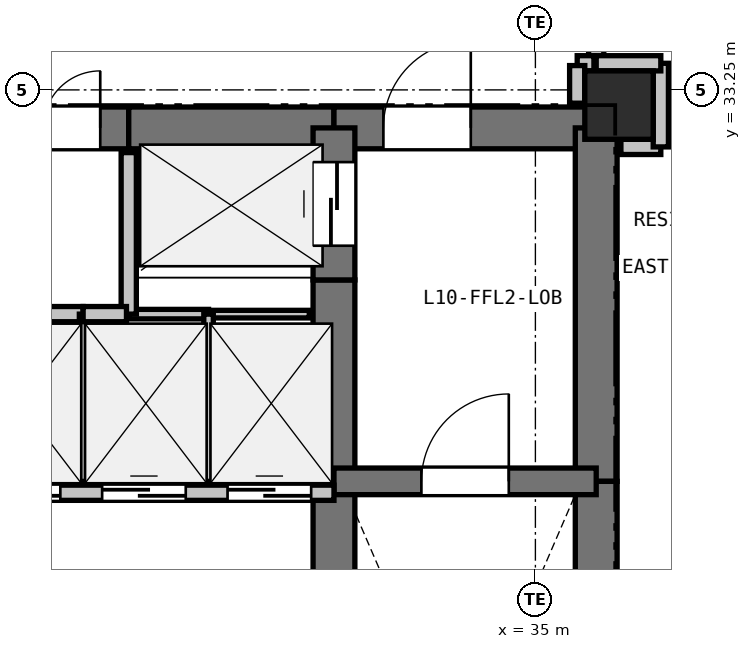
"""IFC4 building model, lengths in metres.
Left out: names, types, materials, properties, quantities, classifications, styles, units other than length and angle.
Written with IfcOpenShell. Run it as: python <this file> out.ifc"""

import sys

from ifc_helpers import new_model, si_unit, direction, frame, frame_2d, origin, origin_2d, place, context, subcontext, project, spatial, rectangle, extrude, element, fill, save


model = new_model("IFC4")
c1 = context("Model", 3, precision=1e-05, world=origin(), true_north=direction((0.0, 1.0)))
c2 = subcontext(c1, "Body", "Model", "MODEL_VIEW")
j1 = project(units=[si_unit("LENGTHUNIT", "METRE"), si_unit("PLANEANGLEUNIT", "RADIAN")], contexts=[c1])
p1 = place(None, origin())
s1 = spatial("IfcSite", under=j1, at=p1, CompositionType="ELEMENT")
p2 = place(p1, origin())
s2 = spatial("IfcBuilding", under=s1, at=p2, CompositionType="ELEMENT")
p3 = place(p2, frame((0.0, 0.0, 39.0)))
s3 = spatial("IfcBuildingStorey", under=s2, at=p3, CompositionType="ELEMENT", Elevation=39.0)
p4 = place(p3, frame((36.1, 33.05, 0.0), z_axis=(0.0, 0.0, 1.0), x_axis=(1.0, 0.0, 0.0)))
e1 = element("IfcColumn", 1, at=p4, inside=s3, PredefinedType="COLUMN", context=c2, shape_type="SweptSolid", body=[
    extrude(rectangle(XDim=0.9, YDim=0.9, at=origin_2d()), origin(), (0.0, 0.0, 1.0), 3.3),
])
p5 = place(p3, frame((27.4, 32.75, 0.0), z_axis=(0.0, 0.0, 1.0), x_axis=(1.0, 0.0, 0.0)))
e2 = element("IfcWall", 2, at=p5, inside=s3, PredefinedType="SHEAR", context=c2, shape_type="SweptSolid", body=[
    extrude(rectangle(XDim=2.25, YDim=0.55, at=frame_2d((1.125, 0.0))), origin(), (0.0, 0.0, 1.0), 3.04),
])
p6 = place(p5, frame((0.375, 0.0, 0.0)))
e3 = element("IfcOpeningElement", 3, at=p6, cuts=e2, PredefinedType="OPENING", context=c2, shape_type="SweptSolid", body=[
    extrude(rectangle(XDim=1.5, YDim=2.2, at=frame_2d((0.75, 1.1))), frame((0.0, 0.285, 0.0), z_axis=(0.0, -1.0, 0.0), x_axis=(1.0, 0.0, 0.0)), (0.0, 0.0, 1.0), 0.57),
])
p7 = place(p3, frame((29.65, 32.75, 0.0), z_axis=(0.0, 0.0, 1.0), x_axis=(1.0, 0.0, 0.0)))
e4 = element("IfcWall", 4, at=p7, inside=s3, PredefinedType="SHEAR", context=c2, shape_type="SweptSolid", body=[
    extrude(rectangle(XDim=2.7, YDim=0.55, at=frame_2d((1.35, 0.0))), origin(), (0.0, 0.0, 1.0), 3.04),
])
p8 = place(p3, frame((32.35, 32.75, 0.0), z_axis=(0.0, 0.0, 1.0), x_axis=(1.0, 0.0, 0.0)))
e5 = element("IfcWall", 5, at=p8, inside=s3, PredefinedType="SHEAR", context=c2, shape_type="SweptSolid", body=[
    extrude(rectangle(XDim=3.45, YDim=0.55, at=frame_2d((1.725, 0.0))), origin(), (0.0, 0.0, 1.0), 3.04),
])
p9 = place(p8, frame((0.65, 0.0, 0.0)))
e6 = element("IfcOpeningElement", 6, at=p9, cuts=e5, PredefinedType="OPENING", context=c2, shape_type="SweptSolid", body=[
    extrude(rectangle(XDim=1.15, YDim=2.15, at=frame_2d((0.575, 1.075))), frame((0.0, 0.285, 0.0), z_axis=(0.0, -1.0, 0.0), x_axis=(1.0, 0.0, 0.0)), (0.0, 0.0, 1.0), 0.57),
])
p10 = place(p3, frame((35.8, 32.75, 0.0), z_axis=(0.0, 0.0, 1.0), x_axis=(0.0, -1.0, 0.0)))
e7 = element("IfcWall", 7, at=p10, inside=s3, PredefinedType="SHEAR", context=c2, shape_type="SweptSolid", body=[
    extrude(rectangle(XDim=4.65, YDim=0.55, at=frame_2d((2.325, 0.0))), origin(), (0.0, 0.0, 1.0), 3.04),
])
p11 = place(p3, frame((35.8, 28.1, 0.0), z_axis=(0.0, 0.0, 1.0), x_axis=(0.0, -1.0, 0.0)))
e8 = element("IfcWall", 8, at=p11, inside=s3, PredefinedType="SHEAR", context=c2, shape_type="SweptSolid", body=[
    extrude(rectangle(XDim=7.35, YDim=0.55, at=frame_2d((3.675, 0.0))), origin(), (0.0, 0.0, 1.0), 3.04),
])
p12 = place(p3, frame((32.35, 25.55, 0.0), z_axis=(0.0, 0.0, 1.0), x_axis=(0.0, 1.0, 0.0)))
e9 = element("IfcWall", 9, at=p12, inside=s3, PredefinedType="SHEAR", context=c2, shape_type="SweptSolid", body=[
    extrude(rectangle(XDim=2.4, YDim=0.55, at=frame_2d((1.2, 0.0))), origin(), (0.0, 0.0, 1.0), 3.04),
])
p13 = place(p3, frame((32.35, 27.95, 0.0), z_axis=(0.0, 0.0, 1.0), x_axis=(0.0, 1.0, 0.0)))
e10 = element("IfcWall", 10, at=p13, inside=s3, PredefinedType="SHEAR", context=c2, shape_type="SweptSolid", body=[
    extrude(rectangle(XDim=2.8, YDim=0.55, at=frame_2d((1.4, 0.0))), origin(), (0.0, 0.0, 1.0), 3.04),
])
p14 = place(p3, frame((32.35, 30.75, 0.0), z_axis=(0.0, 0.0, 1.0), x_axis=(0.0, 1.0, 0.0)))
e11 = element("IfcWall", 11, at=p14, inside=s3, PredefinedType="SHEAR", context=c2, shape_type="SweptSolid", body=[
    extrude(rectangle(XDim=2.0, YDim=0.55, at=frame_2d((1.0, 0.0))), origin(), (0.0, 0.0, 1.0), 3.04),
])
p15 = place(p14, frame((0.45, 0.0, 0.0)))
e12 = element("IfcOpeningElement", 12, at=p15, cuts=e11, PredefinedType="OPENING", context=c2, shape_type="SweptSolid", body=[
    extrude(rectangle(XDim=1.1, YDim=2.15, at=frame_2d((0.55, 1.075))), frame((0.0, 0.285, 0.0), z_axis=(0.0, -1.0, 0.0), x_axis=(1.0, 0.0, 0.0)), (0.0, 0.0, 1.0), 0.57),
])
p16 = place(p3, frame((32.35, 28.1, 0.0), z_axis=(0.0, 0.0, 1.0), x_axis=(1.0, 0.0, 0.0)))
e13 = element("IfcWall", 13, at=p16, inside=s3, PredefinedType="SHEAR", context=c2, shape_type="SweptSolid", body=[
    extrude(rectangle(XDim=3.45, YDim=0.35, at=frame_2d((1.725, 0.0))), origin(), (0.0, 0.0, 1.0), 3.04),
])
p17 = place(p16, frame((1.15, 0.0, 0.0)))
e14 = element("IfcOpeningElement", 14, at=p17, cuts=e13, PredefinedType="OPENING", context=c2, shape_type="SweptSolid", body=[
    extrude(rectangle(XDim=1.15, YDim=2.15, at=frame_2d((0.575, 1.075))), frame((0.0, 0.185, 0.0), z_axis=(0.0, -1.0, 0.0), x_axis=(1.0, 0.0, 0.0)), (0.0, 0.0, 1.0), 0.37),
])
p18 = place(p3, frame((27.4, 27.95, 0.0), z_axis=(0.0, 0.0, 1.0), x_axis=(1.0, 0.0, 0.0)))
e15 = element("IfcWall", 15, at=p18, inside=s3, PredefinedType="PARTITIONING", context=c2, shape_type="SweptSolid", body=[
    extrude(rectangle(XDim=4.95, YDim=0.2, at=frame_2d((2.475, 0.0))), origin(), (0.0, 0.0, 1.0), 3.04),
])
p19 = place(p18, frame((0.25, 0.0, 0.0)))
e16 = element("IfcOpeningElement", 16, at=p19, cuts=e15, PredefinedType="OPENING", context=c2, shape_type="SweptSolid", body=[
    extrude(rectangle(XDim=1.1, YDim=2.15, at=frame_2d((0.55, 1.075))), frame((0.0, 0.11, 0.0), z_axis=(0.0, -1.0, 0.0), x_axis=(1.0, 0.0, 0.0)), (0.0, 0.0, 1.0), 0.22),
])
p20 = place(p18, frame((1.9, 0.0, 0.0)))
e17 = element("IfcOpeningElement", 17, at=p20, cuts=e15, PredefinedType="OPENING", context=c2, shape_type="SweptSolid", body=[
    extrude(rectangle(XDim=1.1, YDim=2.15, at=frame_2d((0.55, 1.075))), frame((0.0, 0.11, 0.0), z_axis=(0.0, -1.0, 0.0), x_axis=(1.0, 0.0, 0.0)), (0.0, 0.0, 1.0), 0.22),
])
p21 = place(p18, frame((3.55, 0.0, 0.0)))
e18 = element("IfcOpeningElement", 18, at=p21, cuts=e15, PredefinedType="OPENING", context=c2, shape_type="SweptSolid", body=[
    extrude(rectangle(XDim=1.1, YDim=2.15, at=frame_2d((0.55, 1.075))), frame((0.0, 0.11, 0.0), z_axis=(0.0, -1.0, 0.0), x_axis=(1.0, 0.0, 0.0)), (0.0, 0.0, 1.0), 0.22),
])
p22 = place(p3, frame((32.025, 30.3, 0.0), z_axis=(0.0, 0.0, 1.0), x_axis=(-1.0, 0.0, 0.0)))
e19 = element("IfcWall", 19, at=p22, inside=s3, PredefinedType="PARTITIONING", context=c2, shape_type="SweptSolid", body=[
    extrude(rectangle(XDim=1.325, YDim=0.1, at=frame_2d((0.663, 0.0))), origin(), (0.0, 0.0, 1.0), 3.04),
])
p23 = place(p3, frame((30.7, 30.3, 0.0), z_axis=(0.0, 0.0, 1.0), x_axis=(-1.0, 0.0, 0.0)))
e20 = element("IfcWall", 20, at=p23, inside=s3, PredefinedType="PARTITIONING", context=c2, shape_type="SweptSolid", body=[
    extrude(rectangle(XDim=1.05, YDim=0.125, at=frame_2d((0.525, 0.0))), origin(), (0.0, 0.0, 1.0), 3.04),
])
p24 = place(p3, frame((29.65, 30.3, 0.0), z_axis=(0.0, 0.0, 1.0), x_axis=(0.0, 1.0, 0.0)))
e21 = element("IfcWall", 21, at=p24, inside=s3, PredefinedType="PARTITIONING", context=c2, shape_type="SweptSolid", body=[
    extrude(rectangle(XDim=2.125, YDim=0.2, at=frame_2d((1.062, 0.0))), origin(), (0.0, 0.0, 1.0), 3.04),
])
p25 = place(p3, frame((27.4, 30.3, 0.0), z_axis=(0.0, 0.0, 1.0), x_axis=(1.0, 0.0, 0.0)))
e22 = element("IfcWall", 22, at=p25, inside=s3, PredefinedType="PARTITIONING", context=c2, shape_type="SweptSolid", body=[
    extrude(rectangle(XDim=1.65, YDim=0.2, at=frame_2d((0.825, 0.0))), origin(), (0.0, 0.0, 1.0), 3.04),
])
p26 = place(p3, frame((29.05, 30.3, 0.0), z_axis=(0.0, 0.0, 1.0), x_axis=(0.0, -1.0, 0.0)))
e23 = element("IfcWall", 23, at=p26, inside=s3, PredefinedType="PARTITIONING", context=c2, shape_type="SweptSolid", body=[
    extrude(rectangle(XDim=2.2, YDim=0.1, at=frame_2d((1.1, 0.0))), origin(), (0.0, 0.0, 1.0), 3.04),
])
p27 = place(p3, frame((29.05, 30.3, 0.0), z_axis=(0.0, 0.0, 1.0), x_axis=(1.0, 0.0, 0.0)))
e24 = element("IfcWall", 24, at=p27, inside=s3, PredefinedType="PARTITIONING", context=c2, shape_type="SweptSolid", body=[
    extrude(rectangle(XDim=0.57, YDim=0.2, at=frame_2d((0.285, 0.0))), origin(), (0.0, 0.0, 1.0), 3.04),
])
p28 = place(p3, frame((30.7, 30.3, 0.0), z_axis=(0.0, 0.0, 1.0), x_axis=(0.0, -1.0, 0.0)))
e25 = element("IfcWall", 25, at=p28, inside=s3, PredefinedType="PARTITIONING", context=c2, shape_type="SweptSolid", body=[
    extrude(rectangle(XDim=2.2, YDim=0.125, at=frame_2d((1.1, 0.0))), origin(), (0.0, 0.0, 1.0), 3.04),
])
p29 = place(p3, frame((35.8, 35.35, 0.0), z_axis=(0.0, 0.0, 1.0), x_axis=(0.0, -1.0, 0.0)))
e26 = element("IfcWall", 26, at=p29, inside=s3, PredefinedType="PARTITIONING", context=c2, shape_type="SweptSolid", body=[
    extrude(rectangle(XDim=1.75, YDim=0.2, at=frame_2d((0.875, 0.0))), origin(), (0.0, 0.0, 1.0), 3.04),
])
p30 = place(p29, frame((0.375, 0.0, 0.0)))
e27 = element("IfcOpeningElement", 27, at=p30, cuts=e26, PredefinedType="OPENING", context=c2, shape_type="SweptSolid", body=[
    extrude(rectangle(XDim=1.0, YDim=2.15, at=frame_2d((0.5, 1.075))), frame((0.0, 0.11, 0.0), z_axis=(0.0, -1.0, 0.0), x_axis=(1.0, 0.0, 0.0)), (0.0, 0.0, 1.0), 0.22),
])
p31 = place(p3, frame((35.77, 33.6, 0.0), z_axis=(0.0, 0.0, 1.0), x_axis=(-1.0, 0.0, 0.0)))
e28 = element("IfcWall", 28, at=p31, inside=s3, PredefinedType="PARTITIONING", context=c2, shape_type="SweptSolid", body=[
    extrude(rectangle(XDim=0.22, YDim=0.2, at=frame_2d((0.11, 0.0))), origin(), (0.0, 0.0, 1.0), 3.04),
])
p32 = place(p3, frame((35.55, 33.57, 0.0), z_axis=(0.0, 0.0, 1.0), x_axis=(0.0, -1.0, 0.0)))
e29 = element("IfcWall", 29, at=p32, inside=s3, PredefinedType="PARTITIONING", context=c2, shape_type="SweptSolid", body=[
    extrude(rectangle(XDim=0.495, YDim=0.2, at=frame_2d((0.248, 0.0))), origin(), (0.0, 0.0, 1.0), 2.488),
])
p33 = place(p3, frame((36.125, 32.5, 0.0), z_axis=(0.0, 0.0, 1.0), x_axis=(1.0, 0.0, 0.0)))
e30 = element("IfcWall", 30, at=p33, inside=s3, PredefinedType="PARTITIONING", context=c2, shape_type="SweptSolid", body=[
    extrude(rectangle(XDim=0.525, YDim=0.2, at=frame_2d((0.262, 0.0))), origin(), (0.0, 0.0, 1.0), 2.488),
])
p34 = place(p3, frame((36.65, 32.5, 0.0), z_axis=(0.0, 0.0, 1.0), x_axis=(0.0, 1.0, 0.0)))
e31 = element("IfcWall", 31, at=p34, inside=s3, PredefinedType="PARTITIONING", context=c2, shape_type="SweptSolid", body=[
    extrude(rectangle(XDim=1.1, YDim=0.2, at=frame_2d((0.55, 0.0))), origin(), (0.0, 0.0, 1.0), 2.337),
])
p35 = place(p3, frame((36.65, 33.6, 0.0), z_axis=(0.0, 0.0, 1.0), x_axis=(-1.0, 0.0, 0.0)))
e32 = element("IfcWall", 32, at=p35, inside=s3, PredefinedType="PARTITIONING", context=c2, shape_type="SweptSolid", body=[
    extrude(rectangle(XDim=0.85, YDim=0.2, at=frame_2d((0.425, 0.0))), origin(), (0.0, 0.0, 1.0), 2.337),
])
p36 = place(p19, origin())
e33 = element("IfcDoor", 33, at=p36, inside=s3, OperationType="SLIDING_TO_LEFT", PredefinedType="DOOR", context=c2, shape_type="SweptSolid", body=[
    extrude(rectangle(XDim=1.1, YDim=2.15, at=frame_2d((0.55, 1.075))), frame((0.0, 0.025, 0.0), z_axis=(0.0, -1.0, 0.0), x_axis=(1.0, 0.0, 0.0)), (0.0, 0.0, 1.0), 0.05),
])
fill(e16, e33)
p37 = place(p20, origin())
e34 = element("IfcDoor", 34, at=p37, inside=s3, OperationType="SLIDING_TO_LEFT", PredefinedType="DOOR", context=c2, shape_type="SweptSolid", body=[
    extrude(rectangle(XDim=1.1, YDim=2.15, at=frame_2d((0.55, 1.075))), frame((0.0, 0.025, 0.0), z_axis=(0.0, -1.0, 0.0), x_axis=(1.0, 0.0, 0.0)), (0.0, 0.0, 1.0), 0.05),
])
fill(e17, e34)
p38 = place(p21, origin())
e35 = element("IfcDoor", 35, at=p38, inside=s3, OperationType="SLIDING_TO_LEFT", PredefinedType="DOOR", context=c2, shape_type="SweptSolid", body=[
    extrude(rectangle(XDim=1.1, YDim=2.15, at=frame_2d((0.55, 1.075))), frame((0.0, 0.025, 0.0), z_axis=(0.0, -1.0, 0.0), x_axis=(1.0, 0.0, 0.0)), (0.0, 0.0, 1.0), 0.05),
])
fill(e18, e35)
p39 = place(p15, origin())
e36 = element("IfcDoor", 36, at=p39, inside=s3, OperationType="SLIDING_TO_LEFT", PredefinedType="DOOR", context=c2, shape_type="SweptSolid", body=[
    extrude(rectangle(XDim=1.1, YDim=2.15, at=frame_2d((0.55, 1.075))), frame((0.0, 0.025, 0.0), z_axis=(0.0, -1.0, 0.0), x_axis=(1.0, 0.0, 0.0)), (0.0, 0.0, 1.0), 0.05),
])
fill(e12, e36)
p40 = place(p17, origin())
e37 = element("IfcDoor", 37, at=p40, inside=s3, OperationType="SINGLE_SWING_RIGHT", PredefinedType="DOOR", context=c2, shape_type="SweptSolid", body=[
    extrude(rectangle(XDim=1.15, YDim=2.15, at=frame_2d((0.575, 1.075))), frame((0.0, 0.025, 0.0), z_axis=(0.0, -1.0, 0.0), x_axis=(1.0, 0.0, 0.0)), (0.0, 0.0, 1.0), 0.05),
])
fill(e14, e37)
p41 = place(p9, origin())
e38 = element("IfcDoor", 38, at=p41, inside=s3, OperationType="SINGLE_SWING_RIGHT", PredefinedType="DOOR", context=c2, shape_type="SweptSolid", body=[
    extrude(rectangle(XDim=1.15, YDim=2.15, at=frame_2d((0.575, 1.075))), frame((0.0, 0.025, 0.0), z_axis=(0.0, -1.0, 0.0), x_axis=(1.0, 0.0, 0.0)), (0.0, 0.0, 1.0), 0.05),
])
fill(e6, e38)
p42 = place(p6, origin())
e39 = element("IfcDoor", 39, at=p42, inside=s3, OperationType="DOUBLE_DOOR_SINGLE_SWING", PredefinedType="DOOR", context=c2, shape_type="SweptSolid", body=[
    extrude(rectangle(XDim=1.5, YDim=2.2, at=frame_2d((0.75, 1.1))), frame((0.0, 0.025, 0.0), z_axis=(0.0, -1.0, 0.0), x_axis=(1.0, 0.0, 0.0)), (0.0, 0.0, 1.0), 0.05),
])
fill(e3, e39)
save(model, sys.argv[1])
